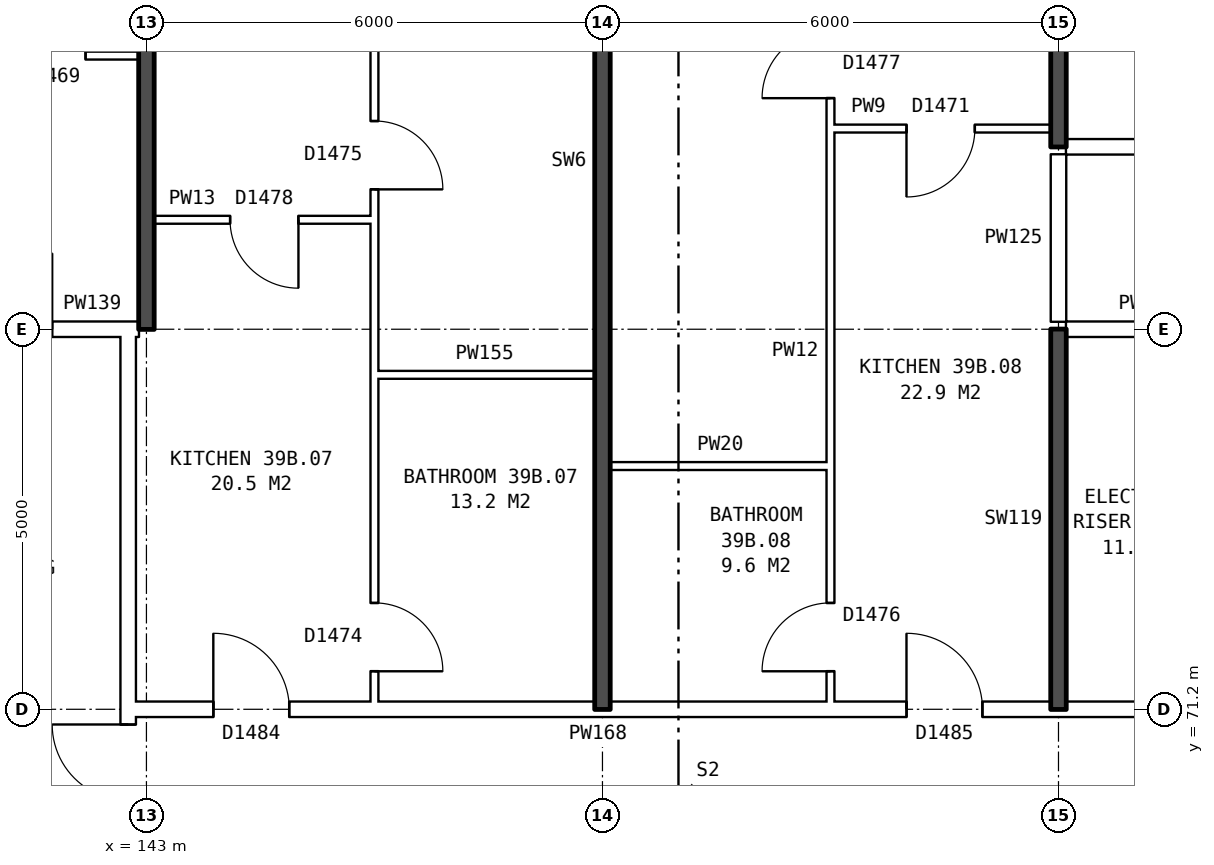
"""IFC4 building model, lengths in metres.
Left out: names, types, materials, properties, quantities, classifications, styles, units other than length and angle.
Written with IfcOpenShell. Run it as: python <this file> out.ifc"""

import sys

from ifc_helpers import new_model, si_unit, direction, frame, frame_2d, origin, place, context, subcontext, project, spatial, rectangle, extrude, element, fill, save


model = new_model("IFC4")
c1 = context("Model", 3, precision=1e-05, world=origin(), true_north=direction((0.0, 1.0)))
c2 = subcontext(c1, "Body", "Model", "MODEL_VIEW")
j1 = project(units=[si_unit("LENGTHUNIT", "METRE"), si_unit("PLANEANGLEUNIT", "RADIAN")], contexts=[c1])
p1 = place(None, origin())
s1 = spatial("IfcSite", under=j1, at=p1, CompositionType="ELEMENT")
p2 = place(p1, origin())
s2 = spatial("IfcBuilding", under=s1, at=p2, CompositionType="ELEMENT")
p3 = place(p2, frame((0.0, 0.0, 139.2)))
s3 = spatial("IfcBuildingStorey", under=s2, at=p3, CompositionType="ELEMENT", Elevation=139.2)
p4 = place(p3, frame((142.76, 63.9, 0.0), z_axis=(0.0, 0.0, 1.0), x_axis=(0.0, 1.0, 0.0)))
e1 = element("IfcWall", 1, at=p4, inside=s3, PredefinedType="PARTITIONING", context=c2, shape_type="SweptSolid", body=[
    extrude(rectangle(XDim=12.2, YDim=0.2, at=frame_2d((6.1, 0.0))), origin(), (0.0, 0.0, 1.0), 2.85),
])
p5 = place(p4, frame((5.1, 0.0, 0.0)))
e2 = element("IfcOpeningElement", 2, at=p5, cuts=e1, PredefinedType="OPENING", context=c2, shape_type="SweptSolid", body=[
    extrude(rectangle(XDim=2.0, YDim=2.1, at=frame_2d((1.0, 1.05))), frame((0.0, 0.11, 0.0), z_axis=(0.0, -1.0, 0.0), x_axis=(1.0, 0.0, 0.0)), (0.0, 0.0, 1.0), 0.22),
])
p6 = place(p3, frame((142.76, 71.2, 0.0), z_axis=(0.0, 0.0, 1.0), x_axis=(1.0, 0.0, 0.0)))
e3 = element("IfcWall", 3, at=p6, inside=s3, PredefinedType="PARTITIONING", context=c2, shape_type="SweptSolid", body=[
    extrude(rectangle(XDim=14.48, YDim=0.2, at=frame_2d((7.24, 0.0))), origin(), (0.0, 0.0, 1.0), 2.85),
])
p7 = place(p6, frame((1.12, 0.0, 0.0)))
e4 = element("IfcOpeningElement", 4, at=p7, cuts=e3, PredefinedType="OPENING", context=c2, shape_type="SweptSolid", body=[
    extrude(rectangle(XDim=1.0, YDim=2.1, at=frame_2d((0.5, 1.05))), frame((0.0, 0.11, 0.0), z_axis=(0.0, -1.0, 0.0), x_axis=(1.0, 0.0, 0.0)), (0.0, 0.0, 1.0), 0.22),
])
p8 = place(p6, frame((10.24, 0.0, 0.0)))
e5 = element("IfcOpeningElement", 5, at=p8, cuts=e3, PredefinedType="OPENING", context=c2, shape_type="SweptSolid", body=[
    extrude(rectangle(XDim=1.0, YDim=2.1, at=frame_2d((0.5, 1.05))), frame((0.0, 0.11, 0.0), z_axis=(0.0, -1.0, 0.0), x_axis=(1.0, 0.0, 0.0)), (0.0, 0.0, 1.0), 0.22),
])
for number, where, z_axis, x_axis in (
    (6, (149.1, 74.4, 0.0), (0.0, 0.0, 1.0), (1.0, 0.0, 0.0)),
    (7, (146.0, 75.6, 0.0), (0.0, 0.0, 1.0), (1.0, 0.0, 0.0)),
):
    element("IfcWall", number, at=place(p3, frame(where, z_axis=z_axis, x_axis=x_axis)), inside=s3, PredefinedType="PARTITIONING", context=c2, shape_type="SweptSolid", body=[
        extrude(rectangle(XDim=2.9, YDim=0.1, at=frame_2d((1.45, 0.0))), origin(), (0.0, 0.0, 1.0), 2.85),
    ])
p9 = place(p3, frame((139.76, 76.2, 0.0), z_axis=(0.0, 0.0, 1.0), x_axis=(1.0, 0.0, 0.0)))
e8 = element("IfcWall", 8, at=p9, inside=s3, PredefinedType="PARTITIONING", context=c2, shape_type="SweptSolid", body=[
    extrude(rectangle(XDim=3.0, YDim=0.2, at=frame_2d((1.5, 0.0))), origin(), (0.0, 0.0, 1.0), 2.85),
])
p10 = place(p9, frame((1.0, 0.0, 0.0)))
e9 = element("IfcOpeningElement", 9, at=p10, cuts=e8, PredefinedType="OPENING", context=c2, shape_type="SweptSolid", body=[
    extrude(rectangle(XDim=1.0, YDim=2.1, at=frame_2d((0.5, 1.05))), frame((0.0, 0.11, 0.0), z_axis=(0.0, -1.0, 0.0), x_axis=(1.0, 0.0, 0.0)), (0.0, 0.0, 1.0), 0.22),
])
p11 = place(p3, frame((142.76, 76.2, 0.0), z_axis=(0.0, 0.0, 1.0), x_axis=(1.0, 0.0, 0.0)))
e10 = element("IfcWall", 10, at=p11, inside=s3, PredefinedType="PARTITIONING", context=c2, shape_type="SweptSolid", body=[
    extrude(rectangle(XDim=0.14, YDim=0.2, at=frame_2d((0.07, 0.0))), origin(), (0.0, 0.0, 1.0), 2.85),
])
p12 = place(p3, frame((155.1, 76.2, 0.0), z_axis=(0.0, 0.0, 1.0), x_axis=(1.0, 0.0, 0.0)))
e11 = element("IfcWall", 11, at=p12, inside=s3, PredefinedType="PARTITIONING", context=c2, shape_type="SweptSolid", body=[
    extrude(rectangle(XDim=2.14, YDim=0.2, at=frame_2d((1.07, 0.0))), origin(), (0.0, 0.0, 1.0), 2.85),
])
p13 = place(p3, frame((143.1, 77.64, 0.0), z_axis=(0.0, 0.0, 1.0), x_axis=(1.0, 0.0, 0.0)))
e12 = element("IfcWall", 12, at=p13, inside=s3, PredefinedType="PARTITIONING", context=c2, shape_type="SweptSolid", body=[
    extrude(rectangle(XDim=2.9, YDim=0.1, at=frame_2d((1.45, 0.0))), origin(), (0.0, 0.0, 1.0), 2.85),
])
p14 = place(p13, frame((1.0, 0.0, 0.0)))
e13 = element("IfcOpeningElement", 13, at=p14, cuts=e12, PredefinedType="OPENING", context=c2, shape_type="SweptSolid", body=[
    extrude(rectangle(XDim=0.9, YDim=2.1, at=frame_2d((0.45, 1.05))), frame((0.0, 0.06, 0.0), z_axis=(0.0, -1.0, 0.0), x_axis=(1.0, 0.0, 0.0)), (0.0, 0.0, 1.0), 0.12),
])
p15 = place(p3, frame((155.1, 78.6, 0.0), z_axis=(0.0, 0.0, 1.0), x_axis=(1.0, 0.0, 0.0)))
e14 = element("IfcWall", 14, at=p15, inside=s3, PredefinedType="PARTITIONING", context=c2, shape_type="SweptSolid", body=[
    extrude(rectangle(XDim=17.29, YDim=0.2, at=frame_2d((8.645, 0.0))), origin(), (0.0, 0.0, 1.0), 2.85),
])
p16 = place(p15, frame((1.45, 0.0, 0.0)))
e15 = element("IfcOpeningElement", 15, at=p16, cuts=e14, PredefinedType="OPENING", context=c2, shape_type="SweptSolid", body=[
    extrude(rectangle(XDim=1.0, YDim=2.1, at=frame_2d((0.5, 1.05))), frame((0.0, 0.11, 0.0), z_axis=(0.0, -1.0, 0.0), x_axis=(1.0, 0.0, 0.0)), (0.0, 0.0, 1.0), 0.22),
])
p17 = place(p15, frame((8.4, 0.0, 0.0)))
e16 = element("IfcOpeningElement", 16, at=p17, cuts=e14, PredefinedType="OPENING", context=c2, shape_type="SweptSolid", body=[
    extrude(rectangle(XDim=1.0, YDim=2.1, at=frame_2d((0.5, 1.05))), frame((0.0, 0.11, 0.0), z_axis=(0.0, -1.0, 0.0), x_axis=(1.0, 0.0, 0.0)), (0.0, 0.0, 1.0), 0.22),
])
p18 = place(p3, frame((152.0, 78.84, 0.0), z_axis=(0.0, 0.0, 1.0), x_axis=(1.0, 0.0, 0.0)))
e17 = element("IfcWall", 17, at=p18, inside=s3, PredefinedType="PARTITIONING", context=c2, shape_type="SweptSolid", body=[
    extrude(rectangle(XDim=2.9, YDim=0.1, at=frame_2d((1.45, 0.0))), origin(), (0.0, 0.0, 1.0), 2.85),
])
p19 = place(p18, frame((1.0, 0.0, 0.0)))
e18 = element("IfcOpeningElement", 18, at=p19, cuts=e17, PredefinedType="OPENING", context=c2, shape_type="SweptSolid", body=[
    extrude(rectangle(XDim=0.9, YDim=2.1, at=frame_2d((0.45, 1.05))), frame((0.0, 0.06, 0.0), z_axis=(0.0, -1.0, 0.0), x_axis=(1.0, 0.0, 0.0)), (0.0, 0.0, 1.0), 0.12),
])
p20 = place(p3, frame((137.1, 79.8, 0.0), z_axis=(0.0, 0.0, 1.0), x_axis=(1.0, 0.0, 0.0)))
e19 = element("IfcWall", 19, at=p20, inside=s3, PredefinedType="PARTITIONING", context=c2, shape_type="SweptSolid", body=[
    extrude(rectangle(XDim=5.8, YDim=0.1, at=frame_2d((2.9, 0.0))), origin(), (0.0, 0.0, 1.0), 2.85),
])
p21 = place(p20, frame((1.3, 0.0, 0.0)))
e20 = element("IfcOpeningElement", 20, at=p21, cuts=e19, PredefinedType="OPENING", context=c2, shape_type="SweptSolid", body=[
    extrude(rectangle(XDim=0.9, YDim=2.1, at=frame_2d((0.45, 1.05))), frame((0.0, 0.06, 0.0), z_axis=(0.0, -1.0, 0.0), x_axis=(1.0, 0.0, 0.0)), (0.0, 0.0, 1.0), 0.12),
])
p22 = place(p20, frame((4.2, 0.0, 0.0)))
e21 = element("IfcOpeningElement", 21, at=p22, cuts=e19, PredefinedType="OPENING", context=c2, shape_type="SweptSolid", body=[
    extrude(rectangle(XDim=0.9, YDim=2.1, at=frame_2d((0.45, 1.05))), frame((0.0, 0.06, 0.0), z_axis=(0.0, -1.0, 0.0), x_axis=(1.0, 0.0, 0.0)), (0.0, 0.0, 1.0), 0.12),
])
p23 = place(p3, frame((143.0, 76.2, 0.0), z_axis=(0.0, 0.0, 1.0), x_axis=(0.0, 1.0, 0.0)))
e22 = element("IfcWall", 22, at=p23, inside=s3, PredefinedType="SOLIDWALL", context=c2, shape_type="SweptSolid", body=[
    extrude(rectangle(XDim=9.44, YDim=0.2, at=frame_2d((4.72, 0.0))), origin(), (0.0, 0.0, 1.0), 2.85),
])
p24 = place(p3, frame((146.0, 71.3, 0.0), z_axis=(0.0, 0.0, 1.0), x_axis=(0.0, 1.0, 0.0)))
e23 = element("IfcWall", 23, at=p24, inside=s3, PredefinedType="PARTITIONING", context=c2, shape_type="SweptSolid", body=[
    extrude(rectangle(XDim=14.34, YDim=0.1, at=frame_2d((7.17, 0.0))), origin(), (0.0, 0.0, 1.0), 2.85),
])
p25 = place(p24, frame((6.74, 0.0, 0.0)))
e24 = element("IfcOpeningElement", 24, at=p25, cuts=e23, PredefinedType="OPENING", context=c2, shape_type="SweptSolid", body=[
    extrude(rectangle(XDim=0.9, YDim=2.1, at=frame_2d((0.45, 1.05))), frame((0.0, 0.06, 0.0), z_axis=(0.0, -1.0, 0.0), x_axis=(1.0, 0.0, 0.0)), (0.0, 0.0, 1.0), 0.12),
])
p26 = place(p24, frame((0.4, 0.0, 0.0)))
e25 = element("IfcOpeningElement", 25, at=p26, cuts=e23, PredefinedType="OPENING", context=c2, shape_type="SweptSolid", body=[
    extrude(rectangle(XDim=0.9, YDim=2.1, at=frame_2d((0.45, 1.05))), frame((0.0, 0.06, 0.0), z_axis=(0.0, -1.0, 0.0), x_axis=(1.0, 0.0, 0.0)), (0.0, 0.0, 1.0), 0.12),
])
p27 = place(p3, frame((149.0, 71.2, 0.0), z_axis=(0.0, 0.0, 1.0), x_axis=(0.0, 1.0, 0.0)))
e26 = element("IfcWall", 26, at=p27, inside=s3, PredefinedType="SOLIDWALL", context=c2, shape_type="SweptSolid", body=[
    extrude(rectangle(XDim=14.44, YDim=0.2, at=frame_2d((7.22, 0.0))), origin(), (0.0, 0.0, 1.0), 2.85),
])
p28 = place(p3, frame((152.0, 71.3, 0.0), z_axis=(0.0, 0.0, 1.0), x_axis=(0.0, 1.0, 0.0)))
e27 = element("IfcWall", 27, at=p28, inside=s3, PredefinedType="PARTITIONING", context=c2, shape_type="SweptSolid", body=[
    extrude(rectangle(XDim=14.34, YDim=0.1, at=frame_2d((7.17, 0.0))), origin(), (0.0, 0.0, 1.0), 2.85),
])
p29 = place(p28, frame((7.94, 0.0, 0.0)))
e28 = element("IfcOpeningElement", 28, at=p29, cuts=e27, PredefinedType="OPENING", context=c2, shape_type="SweptSolid", body=[
    extrude(rectangle(XDim=0.9, YDim=2.1, at=frame_2d((0.45, 1.05))), frame((0.0, 0.06, 0.0), z_axis=(0.0, -1.0, 0.0), x_axis=(1.0, 0.0, 0.0)), (0.0, 0.0, 1.0), 0.12),
])
p30 = place(p28, frame((0.4, 0.0, 0.0)))
e29 = element("IfcOpeningElement", 29, at=p30, cuts=e27, PredefinedType="OPENING", context=c2, shape_type="SweptSolid", body=[
    extrude(rectangle(XDim=0.9, YDim=2.1, at=frame_2d((0.45, 1.05))), frame((0.0, 0.06, 0.0), z_axis=(0.0, -1.0, 0.0), x_axis=(1.0, 0.0, 0.0)), (0.0, 0.0, 1.0), 0.12),
])
p31 = place(p3, frame((155.0, 71.2, 0.0), z_axis=(0.0, 0.0, 1.0), x_axis=(0.0, 1.0, 0.0)))
e30 = element("IfcWall", 30, at=p31, inside=s3, PredefinedType="SOLIDWALL", context=c2, shape_type="SweptSolid", body=[
    extrude(rectangle(XDim=5.0, YDim=0.2, at=frame_2d((2.5, 0.0))), origin(), (0.0, 0.0, 1.0), 2.85),
])
p32 = place(p3, frame((155.0, 76.3, 0.0), z_axis=(0.0, 0.0, 1.0), x_axis=(0.0, 1.0, 0.0)))
e31 = element("IfcWall", 31, at=p32, inside=s3, PredefinedType="PARTITIONING", context=c2, shape_type="SweptSolid", body=[
    extrude(rectangle(XDim=2.2, YDim=0.2, at=frame_2d((1.1, 0.0))), origin(), (0.0, 0.0, 1.0), 2.85),
])
p33 = place(p3, frame((155.0, 78.6, 0.0), z_axis=(0.0, 0.0, 1.0), x_axis=(0.0, 1.0, 0.0)))
e32 = element("IfcWall", 32, at=p33, inside=s3, PredefinedType="SOLIDWALL", context=c2, shape_type="SweptSolid", body=[
    extrude(rectangle(XDim=7.04, YDim=0.2, at=frame_2d((3.52, 0.0))), origin(), (0.0, 0.0, 1.0), 2.85),
])
p34 = place(p5, origin())
e33 = element("IfcDoor", 33, at=p34, inside=s3, OperationType="DOUBLE_DOOR_SINGLE_SWING", PredefinedType="DOOR", context=c2, shape_type="SweptSolid", body=[
    extrude(rectangle(XDim=2.0, YDim=2.1, at=frame_2d((1.0, 1.05))), frame((0.0, 0.025, 0.0), z_axis=(0.0, -1.0, 0.0), x_axis=(1.0, 0.0, 0.0)), (0.0, 0.0, 1.0), 0.05),
])
fill(e2, e33)
p35 = place(p22, origin())
e34 = element("IfcDoor", 34, at=p35, inside=s3, OperationType="SINGLE_SWING_LEFT", PredefinedType="DOOR", context=c2, shape_type="SweptSolid", body=[
    extrude(rectangle(XDim=0.9, YDim=2.1, at=frame_2d((0.45, 1.05))), frame((0.0, 0.025, 0.0), z_axis=(0.0, -1.0, 0.0), x_axis=(1.0, 0.0, 0.0)), (0.0, 0.0, 1.0), 0.05),
])
fill(e21, e34)
p36 = place(p25, frame((0.9, 0.0, 0.0), z_axis=(0.0, 0.0, 1.0), x_axis=(-1.0, 0.0, 0.0)))
e35 = element("IfcDoor", 35, at=p36, inside=s3, OperationType="SINGLE_SWING_RIGHT", PredefinedType="DOOR", context=c2, shape_type="SweptSolid", body=[
    extrude(rectangle(XDim=0.9, YDim=2.1, at=frame_2d((0.45, 1.05))), frame((0.0, 0.025, 0.0), z_axis=(0.0, -1.0, 0.0), x_axis=(1.0, 0.0, 0.0)), (0.0, 0.0, 1.0), 0.05),
])
fill(e24, e35)
p37 = place(p7, origin())
e36 = element("IfcDoor", 36, at=p37, inside=s3, OperationType="SINGLE_SWING_LEFT", PredefinedType="DOOR", context=c2, shape_type="SweptSolid", body=[
    extrude(rectangle(XDim=1.0, YDim=2.1, at=frame_2d((0.5, 1.05))), frame((0.0, 0.025, 0.0), z_axis=(0.0, -1.0, 0.0), x_axis=(1.0, 0.0, 0.0)), (0.0, 0.0, 1.0), 0.05),
])
fill(e4, e36)
p38 = place(p14, frame((0.9, 0.0, 0.0), z_axis=(0.0, 0.0, 1.0), x_axis=(-1.0, 0.0, 0.0)))
e37 = element("IfcDoor", 37, at=p38, inside=s3, OperationType="SINGLE_SWING_LEFT", PredefinedType="DOOR", context=c2, shape_type="SweptSolid", body=[
    extrude(rectangle(XDim=0.9, YDim=2.1, at=frame_2d((0.45, 1.05))), frame((0.0, 0.025, 0.0), z_axis=(0.0, -1.0, 0.0), x_axis=(1.0, 0.0, 0.0)), (0.0, 0.0, 1.0), 0.05),
])
fill(e13, e37)
p39 = place(p26, frame((0.9, 0.0, 0.0), z_axis=(0.0, 0.0, 1.0), x_axis=(-1.0, 0.0, 0.0)))
e38 = element("IfcDoor", 38, at=p39, inside=s3, OperationType="SINGLE_SWING_RIGHT", PredefinedType="DOOR", context=c2, shape_type="SweptSolid", body=[
    extrude(rectangle(XDim=0.9, YDim=2.1, at=frame_2d((0.45, 1.05))), frame((0.0, 0.025, 0.0), z_axis=(0.0, -1.0, 0.0), x_axis=(1.0, 0.0, 0.0)), (0.0, 0.0, 1.0), 0.05),
])
fill(e25, e38)
p40 = place(p29, origin())
e39 = element("IfcDoor", 39, at=p40, inside=s3, OperationType="SINGLE_SWING_LEFT", PredefinedType="DOOR", context=c2, shape_type="SweptSolid", body=[
    extrude(rectangle(XDim=0.9, YDim=2.1, at=frame_2d((0.45, 1.05))), frame((0.0, 0.025, 0.0), z_axis=(0.0, -1.0, 0.0), x_axis=(1.0, 0.0, 0.0)), (0.0, 0.0, 1.0), 0.05),
])
fill(e28, e39)
p41 = place(p8, origin())
e40 = element("IfcDoor", 40, at=p41, inside=s3, OperationType="SINGLE_SWING_LEFT", PredefinedType="DOOR", context=c2, shape_type="SweptSolid", body=[
    extrude(rectangle(XDim=1.0, YDim=2.1, at=frame_2d((0.5, 1.05))), frame((0.0, 0.025, 0.0), z_axis=(0.0, -1.0, 0.0), x_axis=(1.0, 0.0, 0.0)), (0.0, 0.0, 1.0), 0.05),
])
fill(e5, e40)
p42 = place(p19, frame((0.9, 0.0, 0.0), z_axis=(0.0, 0.0, 1.0), x_axis=(-1.0, 0.0, 0.0)))
e41 = element("IfcDoor", 41, at=p42, inside=s3, OperationType="SINGLE_SWING_RIGHT", PredefinedType="DOOR", context=c2, shape_type="SweptSolid", body=[
    extrude(rectangle(XDim=0.9, YDim=2.1, at=frame_2d((0.45, 1.05))), frame((0.0, 0.025, 0.0), z_axis=(0.0, -1.0, 0.0), x_axis=(1.0, 0.0, 0.0)), (0.0, 0.0, 1.0), 0.05),
])
fill(e18, e41)
p43 = place(p30, origin())
e42 = element("IfcDoor", 42, at=p43, inside=s3, OperationType="SINGLE_SWING_LEFT", PredefinedType="DOOR", context=c2, shape_type="SweptSolid", body=[
    extrude(rectangle(XDim=0.9, YDim=2.1, at=frame_2d((0.45, 1.05))), frame((0.0, 0.025, 0.0), z_axis=(0.0, -1.0, 0.0), x_axis=(1.0, 0.0, 0.0)), (0.0, 0.0, 1.0), 0.05),
])
fill(e29, e42)
save(model, sys.argv[1])
